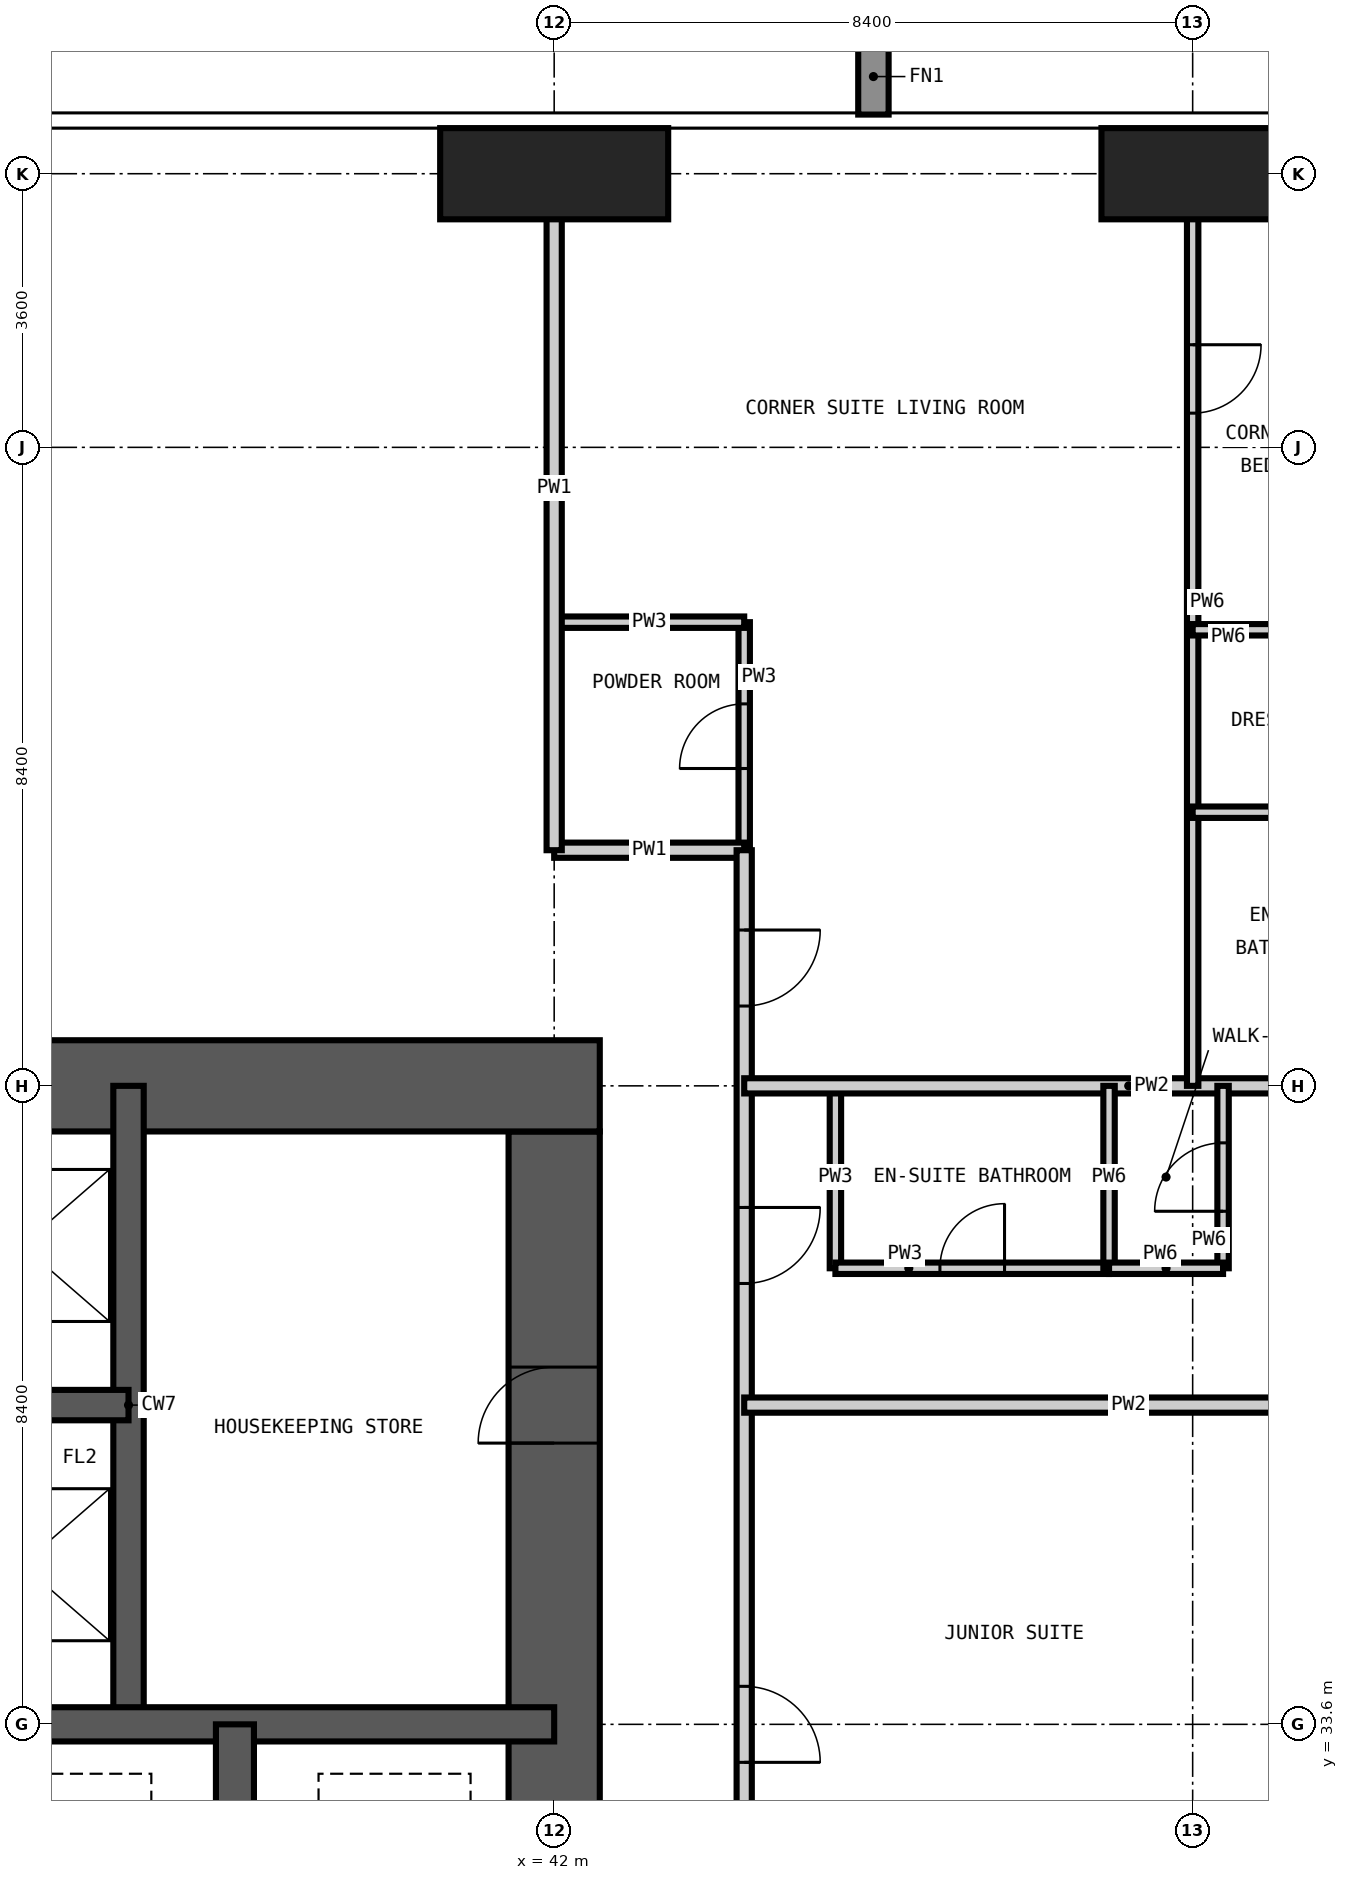
"""IFC4 building model, lengths in metres.
Left out: names, types, materials, properties, quantities, classifications, styles, units other than length and angle.
Written with IfcOpenShell. Run it as: python <this file> out.ifc"""

import sys

from ifc_helpers import new_model, si_unit, direction, frame, frame_2d, origin, origin_2d, place, context, subcontext, project, spatial, rectangle, extrude, element, fill, save


model = new_model("IFC4")
c1 = context("Model", 3, precision=1e-05, world=origin(), true_north=direction((0.0, 1.0)))
c2 = subcontext(c1, "Body", "Model", "MODEL_VIEW")
j1 = project(units=[si_unit("LENGTHUNIT", "METRE"), si_unit("PLANEANGLEUNIT", "RADIAN")], contexts=[c1])
p1 = place(None, origin())
s1 = spatial("IfcSite", under=j1, at=p1, CompositionType="ELEMENT")
p2 = place(p1, origin())
s2 = spatial("IfcBuilding", under=s1, at=p2, CompositionType="ELEMENT")
p3 = place(p2, frame((0.0, 0.0, 216.6)))
s3 = spatial("IfcBuildingStorey", under=s2, at=p3, CompositionType="ELEMENT", Elevation=216.6)
p4 = place(p3, frame((42.0, 54.0, -0.35), z_axis=(0.0, 0.0, 1.0), x_axis=(1.0, 0.0, 0.0)))
e1 = element("IfcColumn", 1, at=p4, inside=s3, PredefinedType="COLUMN", context=c2, shape_type="SweptSolid", body=[
    extrude(rectangle(XDim=3.0, YDim=1.2, at=origin_2d()), origin(), (0.0, 0.0, 1.0), 3.55),
])
p5 = place(p3, frame((50.4, 54.0, -0.35), z_axis=(0.0, 0.0, 1.0), x_axis=(1.0, 0.0, 0.0)))
e2 = element("IfcColumn", 2, at=p5, inside=s3, PredefinedType="COLUMN", context=c2, shape_type="SweptSolid", body=[
    extrude(rectangle(XDim=2.4, YDim=1.2, at=origin_2d()), origin(), (0.0, 0.0, 1.0), 3.55),
])
p6 = place(p3, frame((42.0, 17.4, -0.35), z_axis=(0.0, 0.0, 1.0), x_axis=(0.0, 1.0, 0.0)))
e3 = element("IfcWall", 3, at=p6, inside=s3, PredefinedType="SHEAR", context=c2, shape_type="SweptSolid", body=[
    extrude(rectangle(XDim=24.0, YDim=1.2, at=frame_2d((12.0, 0.0))), origin(), (0.0, 0.0, 1.0), 3.55),
])
p7 = place(p6, frame((0.2, 0.0, 0.35)))
e4 = element("IfcOpeningElement", 4, at=p7, cuts=e3, PredefinedType="OPENING", context=c2, shape_type="SweptSolid", body=[
    extrude(rectangle(XDim=1.2, YDim=2.2, at=frame_2d((0.6, 1.1))), frame((0.0, 0.61, 0.0), z_axis=(0.0, -1.0, 0.0), x_axis=(1.0, 0.0, 0.0)), (0.0, 0.0, 1.0), 1.22),
])
p8 = place(p6, frame((11.5, 0.0, 0.35)))
e5 = element("IfcOpeningElement", 5, at=p8, cuts=e3, PredefinedType="OPENING", context=c2, shape_type="SweptSolid", body=[
    extrude(rectangle(XDim=1.0, YDim=2.1, at=frame_2d((0.5, 1.05))), frame((0.0, 0.61, 0.0), z_axis=(0.0, -1.0, 0.0), x_axis=(1.0, 0.0, 0.0)), (0.0, 0.0, 1.0), 1.22),
])
p9 = place(p6, frame((19.9, 0.0, 0.35)))
e6 = element("IfcOpeningElement", 6, at=p9, cuts=e3, PredefinedType="OPENING", context=c2, shape_type="SweptSolid", body=[
    extrude(rectangle(XDim=1.0, YDim=2.1, at=frame_2d((0.5, 1.05))), frame((0.0, 0.61, 0.0), z_axis=(0.0, -1.0, 0.0), x_axis=(1.0, 0.0, 0.0)), (0.0, 0.0, 1.0), 1.22),
])
p10 = place(p3, frame((42.6, 42.0, -0.35), z_axis=(0.0, 0.0, 1.0), x_axis=(-1.0, 0.0, 0.0)))
e7 = element("IfcWall", 7, at=p10, inside=s3, PredefinedType="SHEAR", context=c2, shape_type="SweptSolid", body=[
    extrude(rectangle(XDim=26.4, YDim=1.2, at=frame_2d((13.2, 0.0))), origin(), (0.0, 0.0, 1.0), 3.55),
])
p11 = place(p10, frame((21.1, 0.0, 0.35)))
e8 = element("IfcOpeningElement", 8, at=p11, cuts=e7, PredefinedType="OPENING", context=c2, shape_type="SweptSolid", body=[
    extrude(rectangle(XDim=1.0, YDim=2.1, at=frame_2d((0.5, 1.05))), frame((0.0, 0.61, 0.0), z_axis=(0.0, -1.0, 0.0), x_axis=(1.0, 0.0, 0.0)), (0.0, 0.0, 1.0), 1.22),
])
p12 = place(p10, frame((10.5, 0.0, 0.35)))
e9 = element("IfcOpeningElement", 9, at=p12, cuts=e7, PredefinedType="OPENING", context=c2, shape_type="SweptSolid", body=[
    extrude(rectangle(XDim=1.2, YDim=2.2, at=frame_2d((0.6, 1.1))), frame((0.0, 0.61, 0.0), z_axis=(0.0, -1.0, 0.0), x_axis=(1.0, 0.0, 0.0)), (0.0, 0.0, 1.0), 1.22),
])
p13 = place(p3, frame((36.4, 33.6, -0.35), z_axis=(0.0, 0.0, 1.0), x_axis=(0.0, 1.0, 0.0)))
e10 = element("IfcWall", 10, at=p13, inside=s3, PredefinedType="SHEAR", context=c2, shape_type="SweptSolid", body=[
    extrude(rectangle(XDim=8.4, YDim=0.4, at=frame_2d((4.2, 0.0))), origin(), (0.0, 0.0, 1.0), 3.55),
])
p14 = place(p3, frame((33.6, 37.8, -0.35), z_axis=(0.0, 0.0, 1.0), x_axis=(1.0, 0.0, 0.0)))
e11 = element("IfcWall", 11, at=p14, inside=s3, PredefinedType="SHEAR", context=c2, shape_type="SweptSolid", body=[
    extrude(rectangle(XDim=2.8, YDim=0.4, at=frame_2d((1.4, 0.0))), origin(), (0.0, 0.0, 1.0), 3.55),
])
p15 = place(p3, frame((16.8, 33.6, -0.35), z_axis=(0.0, 0.0, 1.0), x_axis=(1.0, 0.0, 0.0)))
e12 = element("IfcWall", 12, at=p15, inside=s3, PredefinedType="SHEAR", context=c2, shape_type="SweptSolid", body=[
    extrude(rectangle(XDim=25.2, YDim=0.45, at=frame_2d((12.6, 0.0))), origin(), (0.0, 0.0, 1.0), 3.55),
])
p16 = place(p3, frame((37.8, 30.8, -0.35), z_axis=(0.0, 0.0, 1.0), x_axis=(0.0, 1.0, 0.0)))
e13 = element("IfcWall", 13, at=p16, inside=s3, PredefinedType="SHEAR", context=c2, shape_type="SweptSolid", body=[
    extrude(rectangle(XDim=2.8, YDim=0.5, at=frame_2d((1.4, 0.0))), origin(), (0.0, 0.0, 1.0), 3.55),
])
p17 = place(p3, frame((44.5, 45.1, 0.0), z_axis=(0.0, 0.0, 1.0), x_axis=(0.0, 1.0, 0.0)))
e14 = element("IfcWall", 14, at=p17, inside=s3, PredefinedType="PARTITIONING", context=c2, shape_type="SweptSolid", body=[
    extrude(rectangle(XDim=3.0, YDim=0.15, at=frame_2d((1.5, 0.0))), origin(), (0.0, 0.0, 1.0), 3.2),
])
p18 = place(p17, frame((1.075, 0.0, 0.0)))
e15 = element("IfcOpeningElement", 15, at=p18, cuts=e14, PredefinedType="OPENING", context=c2, shape_type="SweptSolid", body=[
    extrude(rectangle(XDim=0.85, YDim=2.1, at=frame_2d((0.425, 1.05))), frame((0.0, 0.085, 0.0), z_axis=(0.0, -1.0, 0.0), x_axis=(1.0, 0.0, 0.0)), (0.0, 0.0, 1.0), 0.17),
])
p19 = place(p3, frame((45.7, 39.6, 0.0), z_axis=(0.0, 0.0, 1.0), x_axis=(0.0, 1.0, 0.0)))
e16 = element("IfcWall", 16, at=p19, inside=s3, PredefinedType="PARTITIONING", context=c2, shape_type="SweptSolid", body=[
    extrude(rectangle(XDim=2.4, YDim=0.15, at=frame_2d((1.2, 0.0))), origin(), (0.0, 0.0, 1.0), 3.2),
])
p20 = place(p3, frame((45.7, 39.6, 0.0), z_axis=(0.0, 0.0, 1.0), x_axis=(1.0, 0.0, 0.0)))
e17 = element("IfcWall", 17, at=p20, inside=s3, PredefinedType="PARTITIONING", context=c2, shape_type="SweptSolid", body=[
    extrude(rectangle(XDim=3.6, YDim=0.15, at=frame_2d((1.8, 0.0))), origin(), (0.0, 0.0, 1.0), 3.2),
])
p21 = place(p20, frame((1.375, 0.0, 0.0)))
e18 = element("IfcOpeningElement", 18, at=p21, cuts=e17, PredefinedType="OPENING", context=c2, shape_type="SweptSolid", body=[
    extrude(rectangle(XDim=0.85, YDim=2.1, at=frame_2d((0.425, 1.05))), frame((0.0, 0.085, 0.0), z_axis=(0.0, -1.0, 0.0), x_axis=(1.0, 0.0, 0.0)), (0.0, 0.0, 1.0), 0.17),
])
p22 = place(p3, frame((42.0, 48.1, 0.0), z_axis=(0.0, 0.0, 1.0), x_axis=(1.0, 0.0, 0.0)))
e19 = element("IfcWall", 19, at=p22, inside=s3, PredefinedType="PARTITIONING", context=c2, shape_type="SweptSolid", body=[
    extrude(rectangle(XDim=2.5, YDim=0.15, at=frame_2d((1.25, 0.0))), origin(), (0.0, 0.0, 1.0), 3.2),
])
p23 = place(p3, frame((42.0, 45.1, 0.0), z_axis=(0.0, 0.0, 1.0), x_axis=(1.0, 0.0, 0.0)))
e20 = element("IfcWall", 20, at=p23, inside=s3, PredefinedType="PARTITIONING", context=c2, shape_type="SweptSolid", body=[
    extrude(rectangle(XDim=2.5, YDim=0.2, at=frame_2d((1.25, 0.0))), origin(), (0.0, 0.0, 1.0), 3.2),
])
p24 = place(p3, frame((42.0, 54.618, 0.0), z_axis=(0.0, 0.0, 1.0), x_axis=(0.0, -1.0, 0.0)))
e21 = element("IfcWall", 21, at=p24, inside=s3, PredefinedType="PARTITIONING", context=c2, shape_type="SweptSolid", body=[
    extrude(rectangle(XDim=9.518, YDim=0.2, at=frame_2d((4.759, 0.0))), origin(), (0.0, 0.0, 1.0), 3.2),
])
p25 = place(p3, frame((44.5, 45.1, 0.0), z_axis=(0.0, 0.0, 1.0), x_axis=(0.0, -1.0, 0.0)))
e22 = element("IfcWall", 22, at=p25, inside=s3, PredefinedType="PARTITIONING", context=c2, shape_type="SweptSolid", body=[
    extrude(rectangle(XDim=32.0, YDim=0.2, at=frame_2d((16.0, 0.0))), origin(), (0.0, 0.0, 1.0), 3.2),
])
p26 = place(p25, frame((25.7, 0.0, 0.0)))
e23 = element("IfcOpeningElement", 23, at=p26, cuts=e22, PredefinedType="OPENING", context=c2, shape_type="SweptSolid", body=[
    extrude(rectangle(XDim=1.0, YDim=2.2, at=frame_2d((0.5, 1.1))), frame((0.0, 0.11, 0.0), z_axis=(0.0, -1.0, 0.0), x_axis=(1.0, 0.0, 0.0)), (0.0, 0.0, 1.0), 0.22),
])
p27 = place(p25, frame((19.4, 0.0, 0.0)))
e24 = element("IfcOpeningElement", 24, at=p27, cuts=e22, PredefinedType="OPENING", context=c2, shape_type="SweptSolid", body=[
    extrude(rectangle(XDim=1.0, YDim=2.2, at=frame_2d((0.5, 1.1))), frame((0.0, 0.11, 0.0), z_axis=(0.0, -1.0, 0.0), x_axis=(1.0, 0.0, 0.0)), (0.0, 0.0, 1.0), 0.22),
])
p28 = place(p25, frame((11.0, 0.0, 0.0)))
e25 = element("IfcOpeningElement", 25, at=p28, cuts=e22, PredefinedType="OPENING", context=c2, shape_type="SweptSolid", body=[
    extrude(rectangle(XDim=1.0, YDim=2.2, at=frame_2d((0.5, 1.1))), frame((0.0, 0.11, 0.0), z_axis=(0.0, -1.0, 0.0), x_axis=(1.0, 0.0, 0.0)), (0.0, 0.0, 1.0), 0.22),
])
p29 = place(p25, frame((4.7, 0.0, 0.0)))
e26 = element("IfcOpeningElement", 26, at=p29, cuts=e22, PredefinedType="OPENING", context=c2, shape_type="SweptSolid", body=[
    extrude(rectangle(XDim=1.0, YDim=2.2, at=frame_2d((0.5, 1.1))), frame((0.0, 0.11, 0.0), z_axis=(0.0, -1.0, 0.0), x_axis=(1.0, 0.0, 0.0)), (0.0, 0.0, 1.0), 0.22),
])
p30 = place(p25, frame((29.65, 0.0, 0.0)))
e27 = element("IfcOpeningElement", 27, at=p30, cuts=e22, PredefinedType="OPENING", context=c2, shape_type="SweptSolid", body=[
    extrude(rectangle(XDim=1.0, YDim=2.2, at=frame_2d((0.5, 1.1))), frame((0.0, 0.11, 0.0), z_axis=(0.0, -1.0, 0.0), x_axis=(1.0, 0.0, 0.0)), (0.0, 0.0, 1.0), 0.22),
])
p31 = place(p25, frame((1.05, 0.0, 0.0)))
e28 = element("IfcOpeningElement", 28, at=p31, cuts=e22, PredefinedType="OPENING", context=c2, shape_type="SweptSolid", body=[
    extrude(rectangle(XDim=1.0, YDim=2.2, at=frame_2d((0.5, 1.1))), frame((0.0, 0.11, 0.0), z_axis=(0.0, -1.0, 0.0), x_axis=(1.0, 0.0, 0.0)), (0.0, 0.0, 1.0), 0.22),
])
for number, where, z_axis, x_axis in (
    (29, (44.5, 37.8, 0.0), (0.0, 0.0, 1.0), (1.0, 0.0, 0.0)),
    (30, (44.5, 42.0, 0.0), (0.0, 0.0, 1.0), (1.0, 0.0, 0.0)),
):
    element("IfcWall", number, at=place(p3, frame(where, z_axis=z_axis, x_axis=x_axis)), inside=s3, PredefinedType="PARTITIONING", context=c2, shape_type="SweptSolid", body=[
        extrude(rectangle(XDim=10.118, YDim=0.2, at=frame_2d((5.059, 0.0))), origin(), (0.0, 0.0, 1.0), 3.2),
    ])
p32 = place(p3, frame((49.3, 39.6, 0.0), z_axis=(0.0, 0.0, 1.0), x_axis=(0.0, 1.0, 0.0)))
e31 = element("IfcWall", 31, at=p32, inside=s3, PredefinedType="PARTITIONING", context=c2, shape_type="SweptSolid", body=[
    extrude(rectangle(XDim=2.4, YDim=0.15, at=frame_2d((1.2, 0.0))), origin(), (0.0, 0.0, 1.0), 3.2),
])
p33 = place(p3, frame((50.4, 42.0, 0.0), z_axis=(0.0, 0.0, 1.0), x_axis=(0.0, 1.0, 0.0)))
e32 = element("IfcWall", 32, at=p33, inside=s3, PredefinedType="PARTITIONING", context=c2, shape_type="SweptSolid", body=[
    extrude(rectangle(XDim=12.618, YDim=0.15, at=frame_2d((6.309, 0.0))), origin(), (0.0, 0.0, 1.0), 3.2),
])
p34 = place(p33, frame((8.85, 0.0, 0.0)))
e33 = element("IfcOpeningElement", 33, at=p34, cuts=e32, PredefinedType="OPENING", context=c2, shape_type="SweptSolid", body=[
    extrude(rectangle(XDim=0.9, YDim=2.1, at=frame_2d((0.45, 1.05))), frame((0.0, 0.085, 0.0), z_axis=(0.0, -1.0, 0.0), x_axis=(1.0, 0.0, 0.0)), (0.0, 0.0, 1.0), 0.17),
])
p35 = place(p3, frame((50.8, 39.6, 0.0), z_axis=(0.0, 0.0, 1.0), x_axis=(0.0, 1.0, 0.0)))
e34 = element("IfcWall", 34, at=p35, inside=s3, PredefinedType="PARTITIONING", context=c2, shape_type="SweptSolid", body=[
    extrude(rectangle(XDim=2.4, YDim=0.15, at=frame_2d((1.2, 0.0))), origin(), (0.0, 0.0, 1.0), 3.2),
])
p36 = place(p35, frame((0.75, 0.0, 0.0)))
e35 = element("IfcOpeningElement", 35, at=p36, cuts=e34, PredefinedType="OPENING", context=c2, shape_type="SweptSolid", body=[
    extrude(rectangle(XDim=0.9, YDim=2.1, at=frame_2d((0.45, 1.05))), frame((0.0, 0.085, 0.0), z_axis=(0.0, -1.0, 0.0), x_axis=(1.0, 0.0, 0.0)), (0.0, 0.0, 1.0), 0.17),
])
p37 = place(p3, frame((49.3, 39.6, 0.0), z_axis=(0.0, 0.0, 1.0), x_axis=(1.0, 0.0, 0.0)))
e36 = element("IfcWall", 36, at=p37, inside=s3, PredefinedType="PARTITIONING", context=c2, shape_type="SweptSolid", body=[
    extrude(rectangle(XDim=1.5, YDim=0.15, at=frame_2d((0.75, 0.0))), origin(), (0.0, 0.0, 1.0), 3.2),
])
p38 = place(p3, frame((50.4, 45.6, 0.0), z_axis=(0.0, 0.0, 1.0), x_axis=(1.0, 0.0, 0.0)))
e37 = element("IfcWall", 37, at=p38, inside=s3, PredefinedType="PARTITIONING", context=c2, shape_type="SweptSolid", body=[
    extrude(rectangle(XDim=3.0, YDim=0.15, at=frame_2d((1.5, 0.0))), origin(), (0.0, 0.0, 1.0), 3.2),
])
p39 = place(p3, frame((50.4, 48.0, 0.0), z_axis=(0.0, 0.0, 1.0), x_axis=(1.0, 0.0, 0.0)))
e38 = element("IfcWall", 38, at=p39, inside=s3, PredefinedType="PARTITIONING", context=c2, shape_type="SweptSolid", body=[
    extrude(rectangle(XDim=3.0, YDim=0.15, at=frame_2d((1.5, 0.0))), origin(), (0.0, 0.0, 1.0), 3.2),
])
p40 = place(p39, frame((1.05, 0.0, 0.0)))
e39 = element("IfcOpeningElement", 39, at=p40, cuts=e38, PredefinedType="OPENING", context=c2, shape_type="SweptSolid", body=[
    extrude(rectangle(XDim=0.9, YDim=2.1, at=frame_2d((0.45, 1.05))), frame((0.0, 0.085, 0.0), z_axis=(0.0, -1.0, 0.0), x_axis=(1.0, 0.0, 0.0)), (0.0, 0.0, 1.0), 0.17),
])
p41 = place(p28, origin())
e40 = element("IfcDoor", 40, at=p41, inside=s3, OperationType="SINGLE_SWING_RIGHT", PredefinedType="DOOR", context=c2, shape_type="SweptSolid", body=[
    extrude(rectangle(XDim=1.0, YDim=2.2, at=frame_2d((0.5, 1.1))), frame((0.0, 0.025, 0.0), z_axis=(0.0, -1.0, 0.0), x_axis=(1.0, 0.0, 0.0)), (0.0, 0.0, 1.0), 0.05),
])
fill(e25, e40)
p42 = place(p29, origin())
e41 = element("IfcDoor", 41, at=p42, inside=s3, OperationType="SINGLE_SWING_LEFT", PredefinedType="DOOR", context=c2, shape_type="SweptSolid", body=[
    extrude(rectangle(XDim=1.0, YDim=2.2, at=frame_2d((0.5, 1.1))), frame((0.0, 0.025, 0.0), z_axis=(0.0, -1.0, 0.0), x_axis=(1.0, 0.0, 0.0)), (0.0, 0.0, 1.0), 0.05),
])
fill(e26, e41)
p43 = place(p21, origin())
e42 = element("IfcDoor", 42, at=p43, inside=s3, OperationType="SINGLE_SWING_RIGHT", PredefinedType="DOOR", context=c2, shape_type="SweptSolid", body=[
    extrude(rectangle(XDim=0.85, YDim=2.1, at=frame_2d((0.425, 1.05))), frame((0.0, 0.025, 0.0), z_axis=(0.0, -1.0, 0.0), x_axis=(1.0, 0.0, 0.0)), (0.0, 0.0, 1.0), 0.05),
])
fill(e18, e42)
p44 = place(p36, origin())
e43 = element("IfcDoor", 43, at=p44, inside=s3, OperationType="SINGLE_SWING_LEFT", PredefinedType="DOOR", context=c2, shape_type="SweptSolid", body=[
    extrude(rectangle(XDim=0.9, YDim=2.1, at=frame_2d((0.45, 1.05))), frame((0.0, 0.025, 0.0), z_axis=(0.0, -1.0, 0.0), x_axis=(1.0, 0.0, 0.0)), (0.0, 0.0, 1.0), 0.05),
])
fill(e35, e43)
p45 = place(p31, origin())
e44 = element("IfcDoor", 44, at=p45, inside=s3, OperationType="SINGLE_SWING_LEFT", PredefinedType="DOOR", context=c2, shape_type="SweptSolid", body=[
    extrude(rectangle(XDim=1.0, YDim=2.2, at=frame_2d((0.5, 1.1))), frame((0.0, 0.025, 0.0), z_axis=(0.0, -1.0, 0.0), x_axis=(1.0, 0.0, 0.0)), (0.0, 0.0, 1.0), 0.05),
])
fill(e28, e44)
p46 = place(p18, origin())
e45 = element("IfcDoor", 45, at=p46, inside=s3, OperationType="SINGLE_SWING_LEFT", PredefinedType="DOOR", context=c2, shape_type="SweptSolid", body=[
    extrude(rectangle(XDim=0.85, YDim=2.1, at=frame_2d((0.425, 1.05))), frame((0.0, 0.025, 0.0), z_axis=(0.0, -1.0, 0.0), x_axis=(1.0, 0.0, 0.0)), (0.0, 0.0, 1.0), 0.05),
])
fill(e15, e45)
p47 = place(p34, frame((0.9, 0.0, 0.0), z_axis=(0.0, 0.0, 1.0), x_axis=(-1.0, 0.0, 0.0)))
e46 = element("IfcDoor", 46, at=p47, inside=s3, OperationType="SINGLE_SWING_LEFT", PredefinedType="DOOR", context=c2, shape_type="SweptSolid", body=[
    extrude(rectangle(XDim=0.9, YDim=2.1, at=frame_2d((0.45, 1.05))), frame((0.0, 0.025, 0.0), z_axis=(0.0, -1.0, 0.0), x_axis=(1.0, 0.0, 0.0)), (0.0, 0.0, 1.0), 0.05),
])
fill(e33, e46)
p48 = place(p9, origin())
e47 = element("IfcDoor", 47, at=p48, inside=s3, OperationType="SINGLE_SWING_LEFT", PredefinedType="DOOR", context=c2, shape_type="SweptSolid", body=[
    extrude(rectangle(XDim=1.0, YDim=2.1, at=frame_2d((0.5, 1.05))), frame((0.0, 0.025, 0.0), z_axis=(0.0, -1.0, 0.0), x_axis=(1.0, 0.0, 0.0)), (0.0, 0.0, 1.0), 0.05),
])
fill(e6, e47)
save(model, sys.argv[1])
